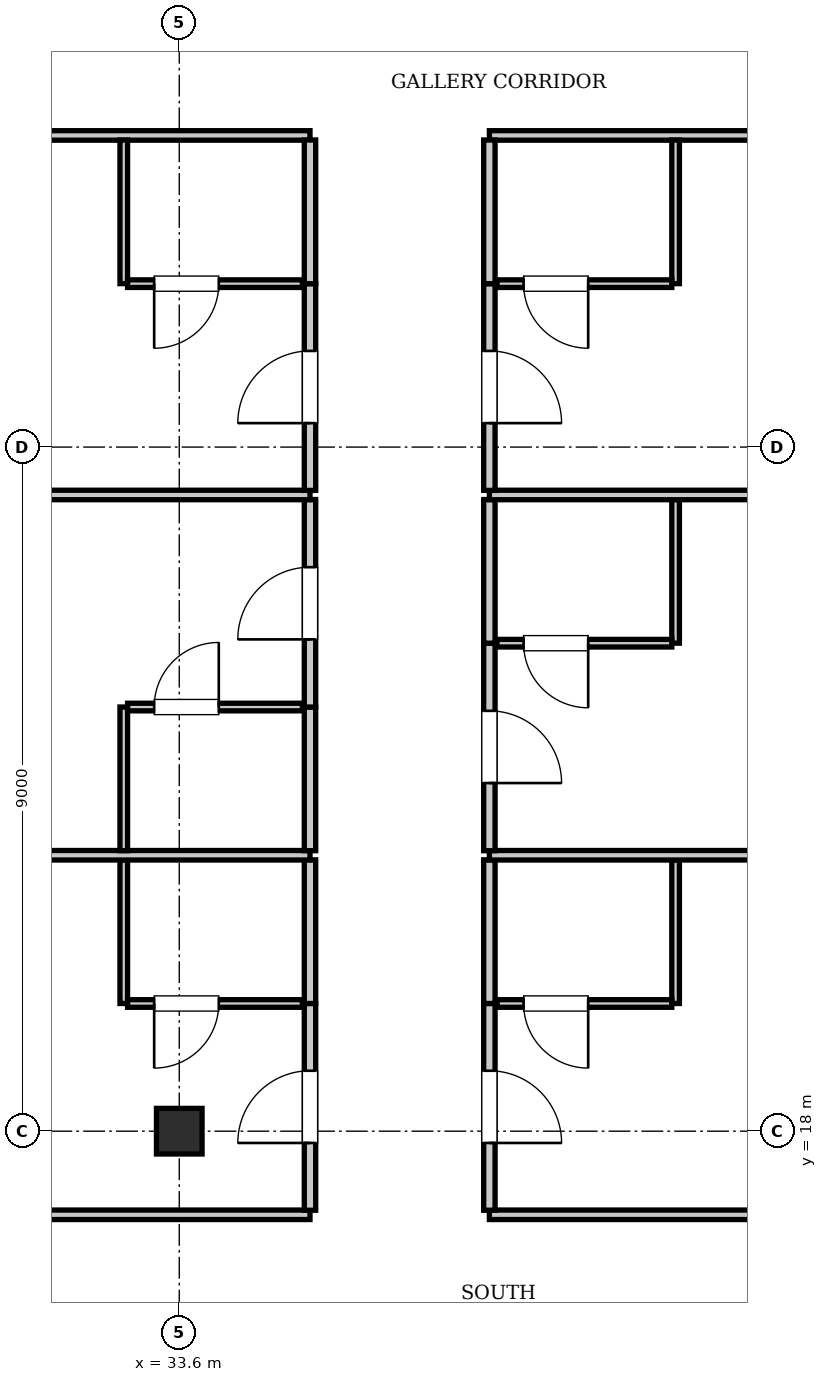
"""IFC4 building model, lengths in metres.
Left out: names, types, materials, properties, quantities, classifications, styles, units other than length and angle.
Written with IfcOpenShell. Run it as: python <this file> out.ifc"""

import sys

from ifc_helpers import new_model, si_unit, direction, frame, frame_2d, origin, origin_2d, place, context, subcontext, project, spatial, rectangle, i_section, extrude, element, fill, save


model = new_model("IFC4")
c1 = context("Model", 3, precision=1e-05, world=origin(), true_north=direction((0.0, 1.0)))
c2 = subcontext(c1, "Body", "Model", "MODEL_VIEW")
j1 = project(units=[si_unit("LENGTHUNIT", "METRE"), si_unit("PLANEANGLEUNIT", "RADIAN")], contexts=[c1])
p1 = place(None, origin())
s1 = spatial("IfcSite", under=j1, at=p1, CompositionType="ELEMENT")
p2 = place(p1, origin())
s2 = spatial("IfcBuilding", under=s1, at=p2, CompositionType="ELEMENT")
p3 = place(p2, frame((0.0, 0.0, 146.65)))
s3 = spatial("IfcBuildingStorey", under=s2, at=p3, CompositionType="ELEMENT", Elevation=146.65)
p4 = place(p3, frame((33.6, 18.0, 0.0), z_axis=(0.0, 0.0, 1.0), x_axis=(1.0, 0.0, 0.0)))
e1 = element("IfcColumn", 1, at=p4, inside=s3, PredefinedType="COLUMN", context=c2, shape_type="SweptSolid", body=[
    extrude(i_section(OverallWidth=0.6, OverallDepth=0.6, WebThickness=0.025, FlangeThickness=0.038, at=origin_2d()), origin(), (0.0, 0.0, 1.0), 3.85),
])
p5 = place(p3, frame((13.2, 16.9, 0.0), z_axis=(0.0, 0.0, 1.0), x_axis=(1.0, 0.0, 0.0)))
e2 = element("IfcWall", 2, at=p5, inside=s3, PredefinedType="PARTITIONING", context=c2, shape_type="SweptSolid", body=[
    extrude(rectangle(XDim=22.12, YDim=0.125, at=frame_2d((11.06, 0.0))), origin(), (0.0, 0.0, 1.0), 3.61),
])
p6 = place(p3, frame((37.68, 16.9, 0.0), z_axis=(0.0, 0.0, 1.0), x_axis=(1.0, 0.0, 0.0)))
e3 = element("IfcWall", 3, at=p6, inside=s3, PredefinedType="PARTITIONING", context=c2, shape_type="SweptSolid", body=[
    extrude(rectangle(XDim=24.72, YDim=0.125, at=frame_2d((12.36, 0.0))), origin(), (0.0, 0.0, 1.0), 3.61),
])
p7 = place(p3, frame((13.2, 31.1, 0.0), z_axis=(0.0, 0.0, 1.0), x_axis=(1.0, 0.0, 0.0)))
e4 = element("IfcWall", 4, at=p7, inside=s3, PredefinedType="PARTITIONING", context=c2, shape_type="SweptSolid", body=[
    extrude(rectangle(XDim=22.12, YDim=0.125, at=frame_2d((11.06, 0.0))), origin(), (0.0, 0.0, 1.0), 3.61),
])
p8 = place(p3, frame((37.68, 31.1, 0.0), z_axis=(0.0, 0.0, 1.0), x_axis=(1.0, 0.0, 0.0)))
e5 = element("IfcWall", 5, at=p8, inside=s3, PredefinedType="PARTITIONING", context=c2, shape_type="SweptSolid", body=[
    extrude(rectangle(XDim=24.72, YDim=0.125, at=frame_2d((12.36, 0.0))), origin(), (0.0, 0.0, 1.0), 3.61),
])
p9 = place(p3, frame((35.32, 16.96, 0.0), z_axis=(0.0, 0.0, 1.0), x_axis=(0.0, 1.0, 0.0)))
e6 = element("IfcWall", 6, at=p9, inside=s3, PredefinedType="PARTITIONING", context=c2, shape_type="SweptSolid", body=[
    extrude(rectangle(XDim=2.72, YDim=0.15, at=frame_2d((1.36, 0.0))), origin(), (0.0, 0.0, 1.0), 3.61),
])
p10 = place(p9, frame((0.885, 0.0, 0.0)))
e7 = element("IfcOpeningElement", 7, at=p10, cuts=e6, PredefinedType="OPENING", context=c2, shape_type="SweptSolid", body=[
    extrude(rectangle(XDim=0.95, YDim=2.15, at=frame_2d((0.475, 1.075))), frame((0.0, 0.085, 0.0), z_axis=(0.0, -1.0, 0.0), x_axis=(1.0, 0.0, 0.0)), (0.0, 0.0, 1.0), 0.17),
])
p11 = place(p3, frame((35.32, 19.68, 0.0), z_axis=(0.0, 0.0, 1.0), x_axis=(0.0, 1.0, 0.0)))
e8 = element("IfcWall", 8, at=p11, inside=s3, PredefinedType="PARTITIONING", context=c2, shape_type="SweptSolid", body=[
    extrude(rectangle(XDim=1.89, YDim=0.15, at=frame_2d((0.945, 0.0))), origin(), (0.0, 0.0, 1.0), 3.61),
])
p12 = place(p3, frame((32.87, 19.68, 0.0), z_axis=(0.0, 0.0, 1.0), x_axis=(0.0, 1.0, 0.0)))
e9 = element("IfcWall", 9, at=p12, inside=s3, PredefinedType="PARTITIONING", context=c2, shape_type="SweptSolid", body=[
    extrude(rectangle(XDim=1.89, YDim=0.1, at=frame_2d((0.945, 0.0))), origin(), (0.0, 0.0, 1.0), 3.61),
])
p13 = place(p3, frame((32.92, 19.68, 0.0), z_axis=(0.0, 0.0, 1.0), x_axis=(1.0, 0.0, 0.0)))
e10 = element("IfcWall", 10, at=p13, inside=s3, PredefinedType="PARTITIONING", context=c2, shape_type="SweptSolid", body=[
    extrude(rectangle(XDim=2.3, YDim=0.1, at=frame_2d((1.15, 0.0))), origin(), (0.0, 0.0, 1.0), 3.61),
])
p14 = place(p13, frame((0.35, 0.0, 0.0)))
e11 = element("IfcOpeningElement", 11, at=p14, cuts=e10, PredefinedType="OPENING", context=c2, shape_type="SweptSolid", body=[
    extrude(rectangle(XDim=0.85, YDim=2.1, at=frame_2d((0.425, 1.05))), frame((0.0, 0.06, 0.0), z_axis=(0.0, -1.0, 0.0), x_axis=(1.0, 0.0, 0.0)), (0.0, 0.0, 1.0), 0.12),
])
p15 = place(p3, frame((37.68, 16.96, 0.0), z_axis=(0.0, 0.0, 1.0), x_axis=(0.0, 1.0, 0.0)))
e12 = element("IfcWall", 12, at=p15, inside=s3, PredefinedType="PARTITIONING", context=c2, shape_type="SweptSolid", body=[
    extrude(rectangle(XDim=2.72, YDim=0.15, at=frame_2d((1.36, 0.0))), origin(), (0.0, 0.0, 1.0), 3.293),
])
p16 = place(p15, frame((0.885, 0.0, 0.0)))
e13 = element("IfcOpeningElement", 13, at=p16, cuts=e12, PredefinedType="OPENING", context=c2, shape_type="SweptSolid", body=[
    extrude(rectangle(XDim=0.95, YDim=2.15, at=frame_2d((0.475, 1.075))), frame((0.0, 0.085, 0.0), z_axis=(0.0, -1.0, 0.0), x_axis=(1.0, 0.0, 0.0)), (0.0, 0.0, 1.0), 0.17),
])
p17 = place(p3, frame((37.68, 19.68, 0.0), z_axis=(0.0, 0.0, 1.0), x_axis=(0.0, 1.0, 0.0)))
e14 = element("IfcWall", 14, at=p17, inside=s3, PredefinedType="PARTITIONING", context=c2, shape_type="SweptSolid", body=[
    extrude(rectangle(XDim=1.89, YDim=0.15, at=frame_2d((0.945, 0.0))), origin(), (0.0, 0.0, 1.0), 3.61),
])
p18 = place(p3, frame((40.13, 19.68, 0.0), z_axis=(0.0, 0.0, 1.0), x_axis=(0.0, 1.0, 0.0)))
e15 = element("IfcWall", 15, at=p18, inside=s3, PredefinedType="PARTITIONING", context=c2, shape_type="SweptSolid", body=[
    extrude(rectangle(XDim=1.89, YDim=0.1, at=frame_2d((0.945, 0.0))), origin(), (0.0, 0.0, 1.0), 3.61),
])
p19 = place(p3, frame((37.78, 19.68, 0.0), z_axis=(0.0, 0.0, 1.0), x_axis=(1.0, 0.0, 0.0)))
e16 = element("IfcWall", 16, at=p19, inside=s3, PredefinedType="PARTITIONING", context=c2, shape_type="SweptSolid", body=[
    extrude(rectangle(XDim=2.3, YDim=0.1, at=frame_2d((1.15, 0.0))), origin(), (0.0, 0.0, 1.0), 3.61),
])
p20 = place(p19, frame((0.35, 0.0, 0.0)))
e17 = element("IfcOpeningElement", 17, at=p20, cuts=e16, PredefinedType="OPENING", context=c2, shape_type="SweptSolid", body=[
    extrude(rectangle(XDim=0.85, YDim=2.1, at=frame_2d((0.425, 1.05))), frame((0.0, 0.06, 0.0), z_axis=(0.0, -1.0, 0.0), x_axis=(1.0, 0.0, 0.0)), (0.0, 0.0, 1.0), 0.12),
])
p21 = place(p3, frame((13.2, 21.63, 0.0), z_axis=(0.0, 0.0, 1.0), x_axis=(1.0, 0.0, 0.0)))
e18 = element("IfcWall", 18, at=p21, inside=s3, PredefinedType="PARTITIONING", context=c2, shape_type="SweptSolid", body=[
    extrude(rectangle(XDim=22.12, YDim=0.125, at=frame_2d((11.06, 0.0))), origin(), (0.0, 0.0, 1.0), 3.61),
])
p22 = place(p3, frame((37.68, 21.63, 0.0), z_axis=(0.0, 0.0, 1.0), x_axis=(1.0, 0.0, 0.0)))
e19 = element("IfcWall", 19, at=p22, inside=s3, PredefinedType="PARTITIONING", context=c2, shape_type="SweptSolid", body=[
    extrude(rectangle(XDim=24.72, YDim=0.125, at=frame_2d((12.36, 0.0))), origin(), (0.0, 0.0, 1.0), 3.61),
])
p23 = place(p3, frame((35.32, 21.69, 0.0), z_axis=(0.0, 0.0, 1.0), x_axis=(0.0, 1.0, 0.0)))
e20 = element("IfcWall", 20, at=p23, inside=s3, PredefinedType="PARTITIONING", context=c2, shape_type="SweptSolid", body=[
    extrude(rectangle(XDim=1.89, YDim=0.15, at=frame_2d((0.945, 0.0))), origin(), (0.0, 0.0, 1.0), 3.61),
])
p24 = place(p3, frame((35.32, 23.58, 0.0), z_axis=(0.0, 0.0, 1.0), x_axis=(0.0, 1.0, 0.0)))
e21 = element("IfcWall", 21, at=p24, inside=s3, PredefinedType="PARTITIONING", context=c2, shape_type="SweptSolid", body=[
    extrude(rectangle(XDim=2.73, YDim=0.15, at=frame_2d((1.365, 0.0))), origin(), (0.0, 0.0, 1.0), 3.61),
])
p25 = place(p24, frame((0.89, 0.0, 0.0)))
e22 = element("IfcOpeningElement", 22, at=p25, cuts=e21, PredefinedType="OPENING", context=c2, shape_type="SweptSolid", body=[
    extrude(rectangle(XDim=0.95, YDim=2.15, at=frame_2d((0.475, 1.075))), frame((0.0, 0.085, 0.0), z_axis=(0.0, -1.0, 0.0), x_axis=(1.0, 0.0, 0.0)), (0.0, 0.0, 1.0), 0.17),
])
p26 = place(p3, frame((32.87, 21.69, 0.0), z_axis=(0.0, 0.0, 1.0), x_axis=(0.0, 1.0, 0.0)))
e23 = element("IfcWall", 23, at=p26, inside=s3, PredefinedType="PARTITIONING", context=c2, shape_type="SweptSolid", body=[
    extrude(rectangle(XDim=1.89, YDim=0.1, at=frame_2d((0.945, 0.0))), origin(), (0.0, 0.0, 1.0), 3.61),
])
p27 = place(p3, frame((32.92, 23.58, 0.0), z_axis=(0.0, 0.0, 1.0), x_axis=(1.0, 0.0, 0.0)))
e24 = element("IfcWall", 24, at=p27, inside=s3, PredefinedType="PARTITIONING", context=c2, shape_type="SweptSolid", body=[
    extrude(rectangle(XDim=2.3, YDim=0.1, at=frame_2d((1.15, 0.0))), origin(), (0.0, 0.0, 1.0), 3.61),
])
p28 = place(p27, frame((0.35, 0.0, 0.0)))
e25 = element("IfcOpeningElement", 25, at=p28, cuts=e24, PredefinedType="OPENING", context=c2, shape_type="SweptSolid", body=[
    extrude(rectangle(XDim=0.85, YDim=2.1, at=frame_2d((0.425, 1.05))), frame((0.0, 0.06, 0.0), z_axis=(0.0, -1.0, 0.0), x_axis=(1.0, 0.0, 0.0)), (0.0, 0.0, 1.0), 0.12),
])
p29 = place(p3, frame((37.68, 21.69, 0.0), z_axis=(0.0, 0.0, 1.0), x_axis=(0.0, 1.0, 0.0)))
e26 = element("IfcWall", 26, at=p29, inside=s3, PredefinedType="PARTITIONING", context=c2, shape_type="SweptSolid", body=[
    extrude(rectangle(XDim=2.73, YDim=0.15, at=frame_2d((1.365, 0.0))), origin(), (0.0, 0.0, 1.0), 3.61),
])
p30 = place(p29, frame((0.89, 0.0, 0.0)))
e27 = element("IfcOpeningElement", 27, at=p30, cuts=e26, PredefinedType="OPENING", context=c2, shape_type="SweptSolid", body=[
    extrude(rectangle(XDim=0.95, YDim=2.15, at=frame_2d((0.475, 1.075))), frame((0.0, 0.085, 0.0), z_axis=(0.0, -1.0, 0.0), x_axis=(1.0, 0.0, 0.0)), (0.0, 0.0, 1.0), 0.17),
])
p31 = place(p3, frame((37.68, 24.42, 0.0), z_axis=(0.0, 0.0, 1.0), x_axis=(0.0, 1.0, 0.0)))
e28 = element("IfcWall", 28, at=p31, inside=s3, PredefinedType="PARTITIONING", context=c2, shape_type="SweptSolid", body=[
    extrude(rectangle(XDim=1.89, YDim=0.15, at=frame_2d((0.945, 0.0))), origin(), (0.0, 0.0, 1.0), 3.61),
])
p32 = place(p3, frame((40.13, 24.42, 0.0), z_axis=(0.0, 0.0, 1.0), x_axis=(0.0, 1.0, 0.0)))
e29 = element("IfcWall", 29, at=p32, inside=s3, PredefinedType="PARTITIONING", context=c2, shape_type="SweptSolid", body=[
    extrude(rectangle(XDim=1.89, YDim=0.1, at=frame_2d((0.945, 0.0))), origin(), (0.0, 0.0, 1.0), 3.61),
])
p33 = place(p3, frame((37.78, 24.42, 0.0), z_axis=(0.0, 0.0, 1.0), x_axis=(1.0, 0.0, 0.0)))
e30 = element("IfcWall", 30, at=p33, inside=s3, PredefinedType="PARTITIONING", context=c2, shape_type="SweptSolid", body=[
    extrude(rectangle(XDim=2.3, YDim=0.1, at=frame_2d((1.15, 0.0))), origin(), (0.0, 0.0, 1.0), 3.61),
])
p34 = place(p33, frame((0.35, 0.0, 0.0)))
e31 = element("IfcOpeningElement", 31, at=p34, cuts=e30, PredefinedType="OPENING", context=c2, shape_type="SweptSolid", body=[
    extrude(rectangle(XDim=0.85, YDim=2.1, at=frame_2d((0.425, 1.05))), frame((0.0, 0.06, 0.0), z_axis=(0.0, -1.0, 0.0), x_axis=(1.0, 0.0, 0.0)), (0.0, 0.0, 1.0), 0.12),
])
p35 = place(p3, frame((13.2, 26.37, 0.0), z_axis=(0.0, 0.0, 1.0), x_axis=(1.0, 0.0, 0.0)))
e32 = element("IfcWall", 32, at=p35, inside=s3, PredefinedType="PARTITIONING", context=c2, shape_type="SweptSolid", body=[
    extrude(rectangle(XDim=22.12, YDim=0.125, at=frame_2d((11.06, 0.0))), origin(), (0.0, 0.0, 1.0), 3.61),
])
p36 = place(p3, frame((37.68, 26.37, 0.0), z_axis=(0.0, 0.0, 1.0), x_axis=(1.0, 0.0, 0.0)))
e33 = element("IfcWall", 33, at=p36, inside=s3, PredefinedType="PARTITIONING", context=c2, shape_type="SweptSolid", body=[
    extrude(rectangle(XDim=24.72, YDim=0.125, at=frame_2d((12.36, 0.0))), origin(), (0.0, 0.0, 1.0), 3.61),
])
p37 = place(p3, frame((35.32, 26.43, 0.0), z_axis=(0.0, 0.0, 1.0), x_axis=(0.0, 1.0, 0.0)))
e34 = element("IfcWall", 34, at=p37, inside=s3, PredefinedType="PARTITIONING", context=c2, shape_type="SweptSolid", body=[
    extrude(rectangle(XDim=2.72, YDim=0.15, at=frame_2d((1.36, 0.0))), origin(), (0.0, 0.0, 1.0), 3.61),
])
p38 = place(p37, frame((0.885, 0.0, 0.0)))
e35 = element("IfcOpeningElement", 35, at=p38, cuts=e34, PredefinedType="OPENING", context=c2, shape_type="SweptSolid", body=[
    extrude(rectangle(XDim=0.95, YDim=2.15, at=frame_2d((0.475, 1.075))), frame((0.0, 0.085, 0.0), z_axis=(0.0, -1.0, 0.0), x_axis=(1.0, 0.0, 0.0)), (0.0, 0.0, 1.0), 0.17),
])
p39 = place(p3, frame((35.32, 29.15, 0.0), z_axis=(0.0, 0.0, 1.0), x_axis=(0.0, 1.0, 0.0)))
e36 = element("IfcWall", 36, at=p39, inside=s3, PredefinedType="PARTITIONING", context=c2, shape_type="SweptSolid", body=[
    extrude(rectangle(XDim=1.89, YDim=0.15, at=frame_2d((0.945, 0.0))), origin(), (0.0, 0.0, 1.0), 3.61),
])
p40 = place(p3, frame((32.87, 29.15, 0.0), z_axis=(0.0, 0.0, 1.0), x_axis=(0.0, 1.0, 0.0)))
e37 = element("IfcWall", 37, at=p40, inside=s3, PredefinedType="PARTITIONING", context=c2, shape_type="SweptSolid", body=[
    extrude(rectangle(XDim=1.89, YDim=0.1, at=frame_2d((0.945, 0.0))), origin(), (0.0, 0.0, 1.0), 3.61),
])
p41 = place(p3, frame((32.92, 29.15, 0.0), z_axis=(0.0, 0.0, 1.0), x_axis=(1.0, 0.0, 0.0)))
e38 = element("IfcWall", 38, at=p41, inside=s3, PredefinedType="PARTITIONING", context=c2, shape_type="SweptSolid", body=[
    extrude(rectangle(XDim=2.3, YDim=0.1, at=frame_2d((1.15, 0.0))), origin(), (0.0, 0.0, 1.0), 3.61),
])
p42 = place(p41, frame((0.35, 0.0, 0.0)))
e39 = element("IfcOpeningElement", 39, at=p42, cuts=e38, PredefinedType="OPENING", context=c2, shape_type="SweptSolid", body=[
    extrude(rectangle(XDim=0.85, YDim=2.1, at=frame_2d((0.425, 1.05))), frame((0.0, 0.06, 0.0), z_axis=(0.0, -1.0, 0.0), x_axis=(1.0, 0.0, 0.0)), (0.0, 0.0, 1.0), 0.12),
])
p43 = place(p3, frame((37.68, 26.43, 0.0), z_axis=(0.0, 0.0, 1.0), x_axis=(0.0, 1.0, 0.0)))
e40 = element("IfcWall", 40, at=p43, inside=s3, PredefinedType="PARTITIONING", context=c2, shape_type="SweptSolid", body=[
    extrude(rectangle(XDim=2.72, YDim=0.15, at=frame_2d((1.36, 0.0))), origin(), (0.0, 0.0, 1.0), 3.61),
])
p44 = place(p43, frame((0.885, 0.0, 0.0)))
e41 = element("IfcOpeningElement", 41, at=p44, cuts=e40, PredefinedType="OPENING", context=c2, shape_type="SweptSolid", body=[
    extrude(rectangle(XDim=0.95, YDim=2.15, at=frame_2d((0.475, 1.075))), frame((0.0, 0.085, 0.0), z_axis=(0.0, -1.0, 0.0), x_axis=(1.0, 0.0, 0.0)), (0.0, 0.0, 1.0), 0.17),
])
p45 = place(p3, frame((37.68, 29.15, 0.0), z_axis=(0.0, 0.0, 1.0), x_axis=(0.0, 1.0, 0.0)))
e42 = element("IfcWall", 42, at=p45, inside=s3, PredefinedType="PARTITIONING", context=c2, shape_type="SweptSolid", body=[
    extrude(rectangle(XDim=1.89, YDim=0.15, at=frame_2d((0.945, 0.0))), origin(), (0.0, 0.0, 1.0), 3.61),
])
p46 = place(p3, frame((40.13, 29.15, 0.0), z_axis=(0.0, 0.0, 1.0), x_axis=(0.0, 1.0, 0.0)))
e43 = element("IfcWall", 43, at=p46, inside=s3, PredefinedType="PARTITIONING", context=c2, shape_type="SweptSolid", body=[
    extrude(rectangle(XDim=1.89, YDim=0.1, at=frame_2d((0.945, 0.0))), origin(), (0.0, 0.0, 1.0), 3.61),
])
p47 = place(p3, frame((37.78, 29.15, 0.0), z_axis=(0.0, 0.0, 1.0), x_axis=(1.0, 0.0, 0.0)))
e44 = element("IfcWall", 44, at=p47, inside=s3, PredefinedType="PARTITIONING", context=c2, shape_type="SweptSolid", body=[
    extrude(rectangle(XDim=2.3, YDim=0.1, at=frame_2d((1.15, 0.0))), origin(), (0.0, 0.0, 1.0), 3.61),
])
p48 = place(p47, frame((0.35, 0.0, 0.0)))
e45 = element("IfcOpeningElement", 45, at=p48, cuts=e44, PredefinedType="OPENING", context=c2, shape_type="SweptSolid", body=[
    extrude(rectangle(XDim=0.85, YDim=2.1, at=frame_2d((0.425, 1.05))), frame((0.0, 0.06, 0.0), z_axis=(0.0, -1.0, 0.0), x_axis=(1.0, 0.0, 0.0)), (0.0, 0.0, 1.0), 0.12),
])
p49 = place(p14, frame((0.85, 0.0, 0.0), z_axis=(0.0, 0.0, 1.0), x_axis=(-1.0, 0.0, 0.0)))
e46 = element("IfcDoor", 46, at=p49, inside=s3, OperationType="SINGLE_SWING_RIGHT", PredefinedType="DOOR", context=c2, shape_type="SweptSolid", body=[
    extrude(rectangle(XDim=0.85, YDim=2.1, at=frame_2d((0.425, 1.05))), frame((0.0, 0.025, 0.0), z_axis=(0.0, -1.0, 0.0), x_axis=(1.0, 0.0, 0.0)), (0.0, 0.0, 1.0), 0.05),
])
fill(e11, e46)
p50 = place(p10, origin())
e47 = element("IfcDoor", 47, at=p50, inside=s3, OperationType="SINGLE_SWING_LEFT", PredefinedType="DOOR", context=c2, shape_type="SweptSolid", body=[
    extrude(rectangle(XDim=0.95, YDim=2.15, at=frame_2d((0.475, 1.075))), frame((0.0, 0.025, 0.0), z_axis=(0.0, -1.0, 0.0), x_axis=(1.0, 0.0, 0.0)), (0.0, 0.0, 1.0), 0.05),
])
fill(e7, e47)
p51 = place(p20, frame((0.85, 0.0, 0.0), z_axis=(0.0, 0.0, 1.0), x_axis=(-1.0, 0.0, 0.0)))
e48 = element("IfcDoor", 48, at=p51, inside=s3, OperationType="SINGLE_SWING_LEFT", PredefinedType="DOOR", context=c2, shape_type="SweptSolid", body=[
    extrude(rectangle(XDim=0.85, YDim=2.1, at=frame_2d((0.425, 1.05))), frame((0.0, 0.025, 0.0), z_axis=(0.0, -1.0, 0.0), x_axis=(1.0, 0.0, 0.0)), (0.0, 0.0, 1.0), 0.05),
])
fill(e17, e48)
p52 = place(p16, frame((0.95, 0.0, 0.0), z_axis=(0.0, 0.0, 1.0), x_axis=(-1.0, 0.0, 0.0)))
e49 = element("IfcDoor", 49, at=p52, inside=s3, OperationType="SINGLE_SWING_RIGHT", PredefinedType="DOOR", context=c2, shape_type="SweptSolid", body=[
    extrude(rectangle(XDim=0.95, YDim=2.15, at=frame_2d((0.475, 1.075))), frame((0.0, 0.025, 0.0), z_axis=(0.0, -1.0, 0.0), x_axis=(1.0, 0.0, 0.0)), (0.0, 0.0, 1.0), 0.05),
])
fill(e13, e49)
p53 = place(p28, origin())
e50 = element("IfcDoor", 50, at=p53, inside=s3, OperationType="SINGLE_SWING_RIGHT", PredefinedType="DOOR", context=c2, shape_type="SweptSolid", body=[
    extrude(rectangle(XDim=0.85, YDim=2.1, at=frame_2d((0.425, 1.05))), frame((0.0, 0.025, 0.0), z_axis=(0.0, -1.0, 0.0), x_axis=(1.0, 0.0, 0.0)), (0.0, 0.0, 1.0), 0.05),
])
fill(e25, e50)
p54 = place(p25, origin())
e51 = element("IfcDoor", 51, at=p54, inside=s3, OperationType="SINGLE_SWING_LEFT", PredefinedType="DOOR", context=c2, shape_type="SweptSolid", body=[
    extrude(rectangle(XDim=0.95, YDim=2.15, at=frame_2d((0.475, 1.075))), frame((0.0, 0.025, 0.0), z_axis=(0.0, -1.0, 0.0), x_axis=(1.0, 0.0, 0.0)), (0.0, 0.0, 1.0), 0.05),
])
fill(e22, e51)
p55 = place(p34, frame((0.85, 0.0, 0.0), z_axis=(0.0, 0.0, 1.0), x_axis=(-1.0, 0.0, 0.0)))
e52 = element("IfcDoor", 52, at=p55, inside=s3, OperationType="SINGLE_SWING_LEFT", PredefinedType="DOOR", context=c2, shape_type="SweptSolid", body=[
    extrude(rectangle(XDim=0.85, YDim=2.1, at=frame_2d((0.425, 1.05))), frame((0.0, 0.025, 0.0), z_axis=(0.0, -1.0, 0.0), x_axis=(1.0, 0.0, 0.0)), (0.0, 0.0, 1.0), 0.05),
])
fill(e31, e52)
p56 = place(p30, frame((0.95, 0.0, 0.0), z_axis=(0.0, 0.0, 1.0), x_axis=(-1.0, 0.0, 0.0)))
e53 = element("IfcDoor", 53, at=p56, inside=s3, OperationType="SINGLE_SWING_RIGHT", PredefinedType="DOOR", context=c2, shape_type="SweptSolid", body=[
    extrude(rectangle(XDim=0.95, YDim=2.15, at=frame_2d((0.475, 1.075))), frame((0.0, 0.025, 0.0), z_axis=(0.0, -1.0, 0.0), x_axis=(1.0, 0.0, 0.0)), (0.0, 0.0, 1.0), 0.05),
])
fill(e27, e53)
p57 = place(p42, frame((0.85, 0.0, 0.0), z_axis=(0.0, 0.0, 1.0), x_axis=(-1.0, 0.0, 0.0)))
e54 = element("IfcDoor", 54, at=p57, inside=s3, OperationType="SINGLE_SWING_RIGHT", PredefinedType="DOOR", context=c2, shape_type="SweptSolid", body=[
    extrude(rectangle(XDim=0.85, YDim=2.1, at=frame_2d((0.425, 1.05))), frame((0.0, 0.025, 0.0), z_axis=(0.0, -1.0, 0.0), x_axis=(1.0, 0.0, 0.0)), (0.0, 0.0, 1.0), 0.05),
])
fill(e39, e54)
p58 = place(p38, origin())
e55 = element("IfcDoor", 55, at=p58, inside=s3, OperationType="SINGLE_SWING_LEFT", PredefinedType="DOOR", context=c2, shape_type="SweptSolid", body=[
    extrude(rectangle(XDim=0.95, YDim=2.15, at=frame_2d((0.475, 1.075))), frame((0.0, 0.025, 0.0), z_axis=(0.0, -1.0, 0.0), x_axis=(1.0, 0.0, 0.0)), (0.0, 0.0, 1.0), 0.05),
])
fill(e35, e55)
p59 = place(p48, frame((0.85, 0.0, 0.0), z_axis=(0.0, 0.0, 1.0), x_axis=(-1.0, 0.0, 0.0)))
e56 = element("IfcDoor", 56, at=p59, inside=s3, OperationType="SINGLE_SWING_LEFT", PredefinedType="DOOR", context=c2, shape_type="SweptSolid", body=[
    extrude(rectangle(XDim=0.85, YDim=2.1, at=frame_2d((0.425, 1.05))), frame((0.0, 0.025, 0.0), z_axis=(0.0, -1.0, 0.0), x_axis=(1.0, 0.0, 0.0)), (0.0, 0.0, 1.0), 0.05),
])
fill(e45, e56)
p60 = place(p44, frame((0.95, 0.0, 0.0), z_axis=(0.0, 0.0, 1.0), x_axis=(-1.0, 0.0, 0.0)))
e57 = element("IfcDoor", 57, at=p60, inside=s3, OperationType="SINGLE_SWING_RIGHT", PredefinedType="DOOR", context=c2, shape_type="SweptSolid", body=[
    extrude(rectangle(XDim=0.95, YDim=2.15, at=frame_2d((0.475, 1.075))), frame((0.0, 0.025, 0.0), z_axis=(0.0, -1.0, 0.0), x_axis=(1.0, 0.0, 0.0)), (0.0, 0.0, 1.0), 0.05),
])
fill(e41, e57)
save(model, sys.argv[1])
